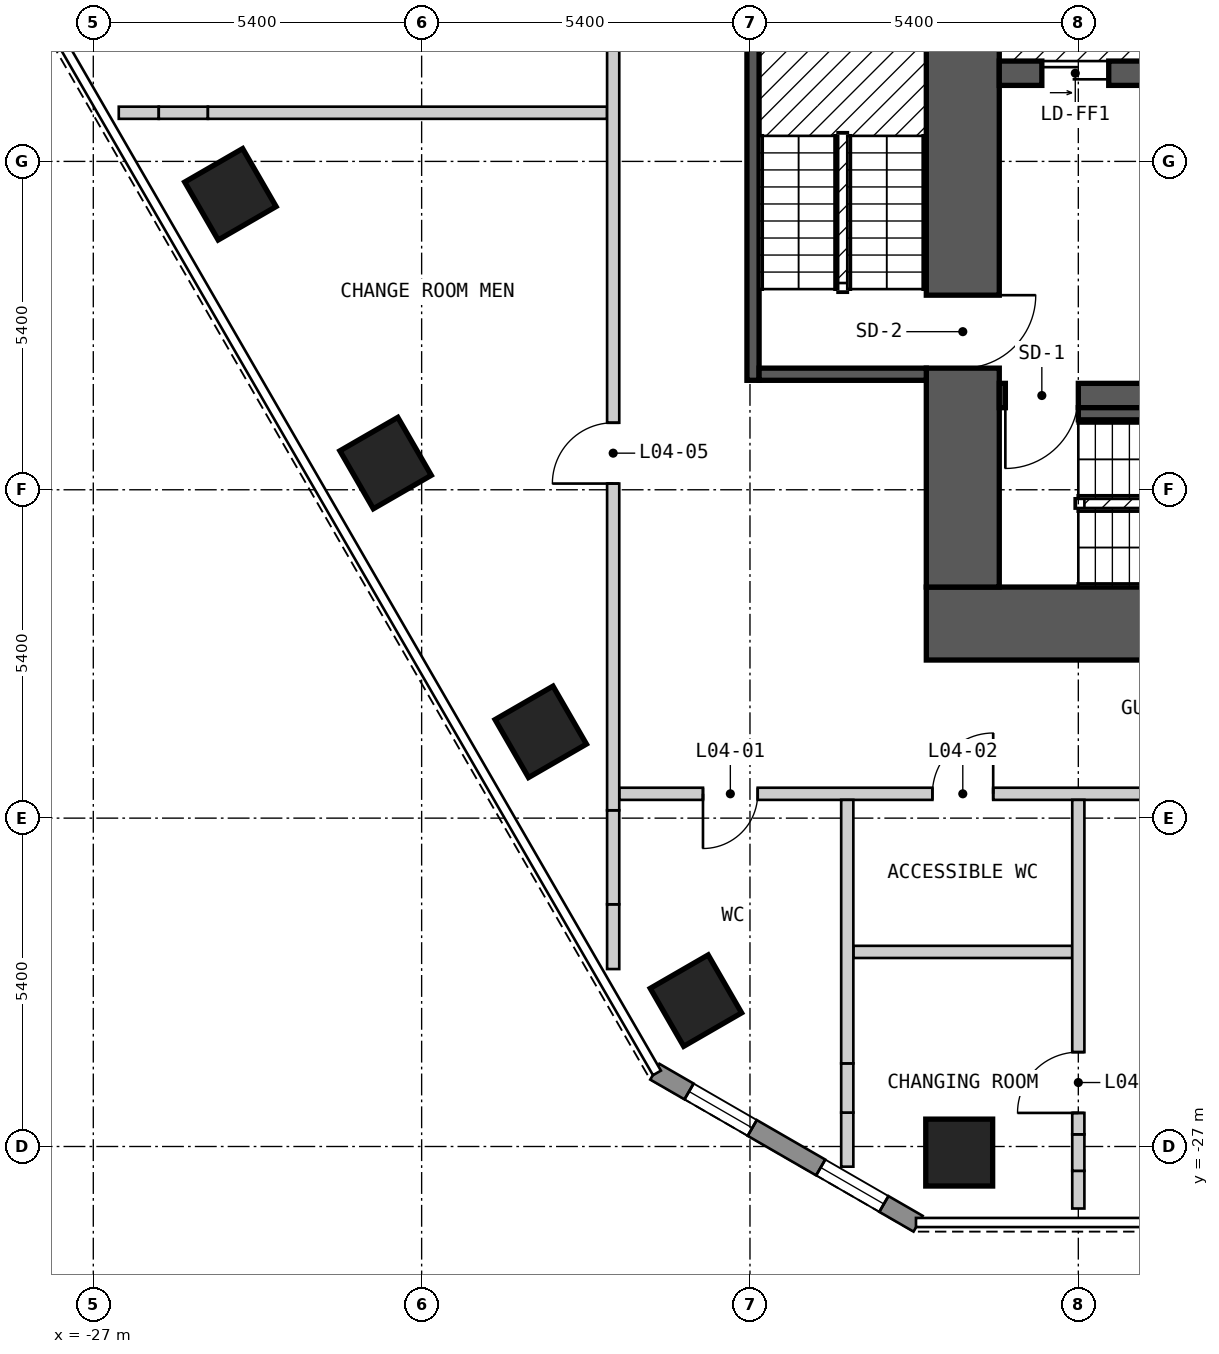
"""IFC4 building model, lengths in metres.
Left out: names, types, materials, properties, quantities, classifications, styles, units other than length and angle.
Written with IfcOpenShell. Run it as: python <this file> out.ifc"""

import sys

from ifc_helpers import new_model, si_unit, direction, frame, frame_2d, origin, origin_2d, place, context, subcontext, project, spatial, polyline, rectangle, outline, extrude, element, fill, save


model = new_model("IFC4")
c1 = context("Model", 3, precision=1e-05, world=origin(), true_north=direction((0.0, 1.0)))
c2 = subcontext(c1, "Body", "Model", "MODEL_VIEW")
j1 = project(units=[si_unit("LENGTHUNIT", "METRE"), si_unit("PLANEANGLEUNIT", "RADIAN")], contexts=[c1])
p1 = place(None, origin())
s1 = spatial("IfcSite", under=j1, at=p1, CompositionType="ELEMENT")
p2 = place(p1, origin())
s2 = spatial("IfcBuilding", under=s1, at=p2, CompositionType="ELEMENT")
p3 = place(p2, frame((0.0, 0.0, 16.2)))
s3 = spatial("IfcBuildingStorey", under=s2, at=p3, CompositionType="ELEMENT", Elevation=16.2)
for number, where, z_axis, x_axis in (
    (1, (-24.745, -11.341, 0.0), (0.0, 0.0, 1.0), (0.5, -0.866, 0.0)),
    (2, (-22.193, -15.761, 0.0), (0.0, 0.0, 1.0), (0.5, -0.866, 0.0)),
    (3, (-19.641, -20.181, 0.0), (0.0, 0.0, 1.0), (0.5, -0.866, 0.0)),
    (4, (-17.089, -24.601, 0.0), (0.0, 0.0, 1.0), (0.5, -0.866, 0.0)),
    (5, (-12.759, -27.1, 0.0), (0.0, 0.0, 1.0), (1.0, 0.0, 0.0)),
):
    element("IfcColumn", number, at=place(p3, frame(where, z_axis=z_axis, x_axis=x_axis)), inside=s3, PredefinedType="COLUMN", context=c2, shape_type="SweptSolid", body=[
        extrude(rectangle(XDim=1.1, YDim=1.1, at=origin_2d()), origin(), (0.0, 0.0, 1.0), 3.6),
    ])
p4 = place(p3, frame((-13.3, -18.4, 0.0), z_axis=(0.0, 0.0, 1.0), x_axis=(1.0, 0.0, 0.0)))
e6 = element("IfcWall", 6, at=p4, inside=s3, PredefinedType="SHEAR", context=c2, shape_type="SweptSolid", body=[
    extrude(rectangle(XDim=26.6, YDim=1.2, at=frame_2d((13.3, 0.0))), origin(), (0.0, 0.0, 1.0), 3.25),
])
p5 = place(p3, frame((-12.7, -17.8, 0.0), z_axis=(0.0, 0.0, 1.0), x_axis=(0.0, 1.0, 0.0)))
e7 = element("IfcWall", 7, at=p5, inside=s3, PredefinedType="SHEAR", context=c2, shape_type="SweptSolid", body=[
    extrude(rectangle(XDim=11.6, YDim=1.2, at=frame_2d((5.8, 0.0))), origin(), (0.0, 0.0, 1.0), 3.25),
])
p6 = place(p5, frame((3.6, 0.0, 0.0)))
e8 = element("IfcOpeningElement", 8, at=p6, cuts=e7, PredefinedType="OPENING", context=c2, shape_type="SweptSolid", body=[
    extrude(rectangle(XDim=1.2, YDim=2.1, at=frame_2d((0.6, 1.05))), frame((0.0, 0.61, 0.0), z_axis=(0.0, -1.0, 0.0), x_axis=(1.0, 0.0, 0.0)), (0.0, 0.0, 1.0), 1.22),
])
p7 = place(p3, frame((-12.1, -14.65, 0.0), z_axis=(0.0, 0.0, 1.0), x_axis=(1.0, 0.0, 0.0)))
e9 = element("IfcWall", 9, at=p7, inside=s3, PredefinedType="SHEAR", context=c2, shape_type="SweptSolid", body=[
    extrude(rectangle(XDim=24.2, YDim=0.4, at=frame_2d((12.1, 0.0))), origin(), (0.0, 0.0, 1.0), 3.25),
])
p8 = place(p7, frame((1.3, 0.0, 0.0), z_axis=(0.0, 0.0, 1.0), x_axis=(-1.0, 0.0, 0.0)))
e10 = element("IfcOpeningElement", 10, at=p8, cuts=e9, PredefinedType="OPENING", context=c2, shape_type="SweptSolid", body=[
    extrude(rectangle(XDim=1.2, YDim=2.1, at=frame_2d((0.6, 1.05))), frame((0.0, 0.21, 0.0), z_axis=(0.0, -1.0, 0.0), x_axis=(1.0, 0.0, 0.0)), (0.0, 0.0, 1.0), 0.42),
])
p9 = place(p7, frame((24.15, 0.0, 0.0), z_axis=(0.0, 0.0, 1.0), x_axis=(-1.0, 0.0, 0.0)))
e11 = element("IfcOpeningElement", 11, at=p9, cuts=e9, PredefinedType="OPENING", context=c2, shape_type="SweptSolid", body=[
    extrude(rectangle(XDim=1.2, YDim=2.1, at=frame_2d((0.6, 1.05))), frame((0.0, 0.21, 0.0), z_axis=(0.0, -1.0, 0.0), x_axis=(1.0, 0.0, 0.0)), (0.0, 0.0, 1.0), 0.42),
])
p10 = place(p7, frame((17.2, 0.0, 0.0), z_axis=(0.0, 0.0, 1.0), x_axis=(-1.0, 0.0, 0.0)))
e12 = element("IfcOpeningElement", 12, at=p10, cuts=e9, PredefinedType="OPENING", context=c2, shape_type="SweptSolid", body=[
    extrude(rectangle(XDim=1.0, YDim=2.1, at=frame_2d((0.5, 1.05))), frame((0.0, 0.21, 0.0), z_axis=(0.0, -1.0, 0.0), x_axis=(1.0, 0.0, 0.0)), (0.0, 0.0, 1.0), 0.42),
])
p11 = place(p3, frame((-12.1, -9.35, 0.0), z_axis=(0.0, 0.0, 1.0), x_axis=(1.0, 0.0, 0.0)))
e13 = element("IfcWall", 13, at=p11, inside=s3, PredefinedType="SHEAR", context=c2, shape_type="SweptSolid", body=[
    extrude(rectangle(XDim=22.3, YDim=0.4, at=frame_2d((11.15, 0.0))), origin(), (0.0, 0.0, 1.0), 3.25),
])
p12 = place(p11, frame((0.7, 0.0, 0.0)))
e14 = element("IfcOpeningElement", 14, at=p12, cuts=e13, PredefinedType="OPENING", context=c2, shape_type="SweptSolid", body=[
    extrude(rectangle(XDim=1.1, YDim=2.1, at=frame_2d((0.55, 1.05))), frame((0.0, 0.21, 0.0), z_axis=(0.0, -1.0, 0.0), x_axis=(1.0, 0.0, 0.0)), (0.0, 0.0, 1.0), 0.42),
])
p13 = place(p11, frame((3.5, 0.0, 0.0)))
e15 = element("IfcOpeningElement", 15, at=p13, cuts=e13, PredefinedType="OPENING", context=c2, shape_type="SweptSolid", body=[
    extrude(rectangle(XDim=1.1, YDim=2.1, at=frame_2d((0.55, 1.05))), frame((0.0, 0.21, 0.0), z_axis=(0.0, -1.0, 0.0), x_axis=(1.0, 0.0, 0.0)), (0.0, 0.0, 1.0), 0.42),
])
p14 = place(p11, frame((6.3, 0.0, 0.0)))
e16 = element("IfcOpeningElement", 16, at=p14, cuts=e13, PredefinedType="OPENING", context=c2, shape_type="SweptSolid", body=[
    extrude(rectangle(XDim=1.1, YDim=2.1, at=frame_2d((0.55, 1.05))), frame((0.0, 0.21, 0.0), z_axis=(0.0, -1.0, 0.0), x_axis=(1.0, 0.0, 0.0)), (0.0, 0.0, 1.0), 0.42),
])
p15 = place(p11, frame((8.6, 0.0, 0.0)))
e17 = element("IfcOpeningElement", 17, at=p15, cuts=e13, PredefinedType="OPENING", context=c2, shape_type="SweptSolid", body=[
    extrude(rectangle(XDim=1.1, YDim=2.1, at=frame_2d((0.55, 1.05))), frame((0.0, 0.21, 0.0), z_axis=(0.0, -1.0, 0.0), x_axis=(1.0, 0.0, 0.0)), (0.0, 0.0, 1.0), 0.42),
])
p16 = place(p11, frame((10.9, 0.0, 0.0)))
e18 = element("IfcOpeningElement", 18, at=p16, cuts=e13, PredefinedType="OPENING", context=c2, shape_type="SweptSolid", body=[
    extrude(rectangle(XDim=1.1, YDim=2.1, at=frame_2d((0.55, 1.05))), frame((0.0, 0.21, 0.0), z_axis=(0.0, -1.0, 0.0), x_axis=(1.0, 0.0, 0.0)), (0.0, 0.0, 1.0), 0.42),
])
p17 = place(p11, frame((13.2, 0.0, 0.0)))
e19 = element("IfcOpeningElement", 19, at=p17, cuts=e13, PredefinedType="OPENING", context=c2, shape_type="SweptSolid", body=[
    extrude(rectangle(XDim=1.1, YDim=2.1, at=frame_2d((0.55, 1.05))), frame((0.0, 0.21, 0.0), z_axis=(0.0, -1.0, 0.0), x_axis=(1.0, 0.0, 0.0)), (0.0, 0.0, 1.0), 0.42),
])
p18 = place(p11, frame((15.5, 0.0, 0.0)))
e20 = element("IfcOpeningElement", 20, at=p18, cuts=e13, PredefinedType="OPENING", context=c2, shape_type="SweptSolid", body=[
    extrude(rectangle(XDim=1.1, YDim=2.1, at=frame_2d((0.55, 1.05))), frame((0.0, 0.21, 0.0), z_axis=(0.0, -1.0, 0.0), x_axis=(1.0, 0.0, 0.0)), (0.0, 0.0, 1.0), 0.42),
])
p19 = place(p11, frame((17.8, 0.0, 0.0)))
e21 = element("IfcOpeningElement", 21, at=p19, cuts=e13, PredefinedType="OPENING", context=c2, shape_type="SweptSolid", body=[
    extrude(rectangle(XDim=1.1, YDim=2.1, at=frame_2d((0.55, 1.05))), frame((0.0, 0.21, 0.0), z_axis=(0.0, -1.0, 0.0), x_axis=(1.0, 0.0, 0.0)), (0.0, 0.0, 1.0), 0.42),
])
p20 = place(p11, frame((20.2, 0.0, 0.0)))
e22 = element("IfcOpeningElement", 22, at=p20, cuts=e13, PredefinedType="OPENING", context=c2, shape_type="SweptSolid", body=[
    extrude(rectangle(XDim=1.1, YDim=2.1, at=frame_2d((0.55, 1.05))), frame((0.0, 0.21, 0.0), z_axis=(0.0, -1.0, 0.0), x_axis=(1.0, 0.0, 0.0)), (0.0, 0.0, 1.0), 0.42),
])
p21 = place(p3, frame((-17.765, -25.77, 0.0), z_axis=(0.0, 0.0, 1.0), x_axis=(0.866010750942, -0.50002537861, 0.0)))
e23 = element("IfcWall", 23, at=p21, inside=s3, PredefinedType="SOLIDWALL", context=c2, shape_type="SweptSolid", body=[
    extrude(outline(polyline([(0.0, -0.15), (5.0, -0.15), (4.919, 0.15), (0.08, 0.15), (0.0, -0.15)])), origin(), (0.0, 0.0, 1.0), 3.25),
])
p22 = place(p21, frame((0.65, 0.0, 0.15)))
e24 = element("IfcOpeningElement", 24, at=p22, cuts=e23, PredefinedType="OPENING", context=c2, shape_type="SweptSolid", body=[
    extrude(rectangle(XDim=1.2, YDim=2.1, at=frame_2d((0.6, 1.05))), frame((0.0, 0.16, 0.0), z_axis=(0.0, -1.0, 0.0), x_axis=(1.0, 0.0, 0.0)), (0.0, 0.0, 1.0), 0.32),
])
p23 = place(p21, frame((3.15, 0.0, 0.15)))
e25 = element("IfcOpeningElement", 25, at=p23, cuts=e23, PredefinedType="OPENING", context=c2, shape_type="SweptSolid", body=[
    extrude(rectangle(XDim=1.2, YDim=2.1, at=frame_2d((0.6, 1.05))), frame((0.0, 0.16, 0.0), z_axis=(0.0, -1.0, 0.0), x_axis=(1.0, 0.0, 0.0)), (0.0, 0.0, 1.0), 0.32),
])
p24 = place(p3, frame((-14.5, -23.8, 0.0), z_axis=(0.0, 0.0, 1.0), x_axis=(1.0, 0.0, 0.0)))
e26 = element("IfcWall", 26, at=p24, inside=s3, PredefinedType="PARTITIONING", context=c2, shape_type="SweptSolid", body=[
    extrude(rectangle(XDim=3.6, YDim=0.2, at=frame_2d((1.8, 0.0))), origin(), (0.0, 0.0, 1.0), 3.25),
])
p25 = place(p3, frame((-18.35, -21.2, 0.0), z_axis=(0.0, 0.0, 1.0), x_axis=(1.0, 0.0, 0.0)))
e27 = element("IfcWall", 27, at=p25, inside=s3, PredefinedType="PARTITIONING", context=c2, shape_type="SweptSolid", body=[
    extrude(rectangle(XDim=24.1, YDim=0.2, at=frame_2d((12.05, 0.0))), origin(), (0.0, 0.0, 1.0), 3.25),
])
p26 = place(p25, frame((2.277, 0.0, 0.0), z_axis=(0.0, 0.0, 1.0), x_axis=(-1.0, 0.0, 0.0)))
e28 = element("IfcOpeningElement", 28, at=p26, cuts=e27, PredefinedType="OPENING", context=c2, shape_type="SweptSolid", body=[
    extrude(rectangle(XDim=0.9, YDim=2.1, at=frame_2d((0.45, 1.05))), frame((0.0, 0.11, 0.0), z_axis=(0.0, -1.0, 0.0), x_axis=(1.0, 0.0, 0.0)), (0.0, 0.0, 1.0), 0.22),
])
p27 = place(p25, frame((6.15, 0.0, 0.0), z_axis=(0.0, 0.0, 1.0), x_axis=(-1.0, 0.0, 0.0)))
e29 = element("IfcOpeningElement", 29, at=p27, cuts=e27, PredefinedType="OPENING", context=c2, shape_type="SweptSolid", body=[
    extrude(rectangle(XDim=1.0, YDim=2.1, at=frame_2d((0.5, 1.05))), frame((0.0, 0.11, 0.0), z_axis=(0.0, -1.0, 0.0), x_axis=(1.0, 0.0, 0.0)), (0.0, 0.0, 1.0), 0.22),
])
p28 = place(p25, frame((14.923, 0.0, 0.0)))
e30 = element("IfcOpeningElement", 30, at=p28, cuts=e27, PredefinedType="OPENING", context=c2, shape_type="SweptSolid", body=[
    extrude(rectangle(XDim=1.8, YDim=2.1, at=frame_2d((0.9, 1.05))), frame((0.0, 0.11, 0.0), z_axis=(0.0, -1.0, 0.0), x_axis=(1.0, 0.0, 0.0)), (0.0, 0.0, 1.0), 0.22),
])
p29 = place(p3, frame((-26.581, -10.0, 0.0), z_axis=(0.0, 0.0, 1.0), x_axis=(1.0, 0.0, 0.0)))
e31 = element("IfcWall", 31, at=p29, inside=s3, PredefinedType="PARTITIONING", context=c2, shape_type="SweptSolid", body=[
    extrude(rectangle(XDim=0.658, YDim=0.2, at=frame_2d((0.329, 0.0))), origin(), (0.0, 0.0, 1.0), 3.25),
])
p30 = place(p3, frame((-25.923, -10.0, 0.0), z_axis=(0.0, 0.0, 1.0), x_axis=(1.0, 0.0, 0.0)))
e32 = element("IfcWall", 32, at=p30, inside=s3, PredefinedType="PARTITIONING", context=c2, shape_type="SweptSolid", body=[
    extrude(rectangle(XDim=0.808, YDim=0.2, at=frame_2d((0.404, 0.0))), origin(), (0.0, 0.0, 1.0), 2.52),
])
p31 = place(p3, frame((-25.115, -10.0, 0.0), z_axis=(0.0, 0.0, 1.0), x_axis=(1.0, 0.0, 0.0)))
e33 = element("IfcWall", 33, at=p31, inside=s3, PredefinedType="PARTITIONING", context=c2, shape_type="SweptSolid", body=[
    extrude(rectangle(XDim=6.565, YDim=0.2, at=frame_2d((3.282, 0.0))), origin(), (0.0, 0.0, 1.0), 3.25),
])
p32 = place(p3, frame((-18.45, -24.082, 0.0), z_axis=(0.0, 0.0, 1.0), x_axis=(0.0, 1.0, 0.0)))
e34 = element("IfcWall", 34, at=p32, inside=s3, PredefinedType="PARTITIONING", context=c2, shape_type="SweptSolid", body=[
    extrude(rectangle(XDim=1.065, YDim=0.2, at=frame_2d((0.532, 0.0))), origin(), (0.0, 0.0, 1.0), 3.25),
])
p33 = place(p3, frame((-18.45, -23.017, 0.0), z_axis=(0.0, 0.0, 1.0), x_axis=(0.0, 1.0, 0.0)))
e35 = element("IfcWall", 35, at=p33, inside=s3, PredefinedType="PARTITIONING", context=c2, shape_type="SweptSolid", body=[
    extrude(rectangle(XDim=1.546, YDim=0.2, at=frame_2d((0.773, 0.0))), origin(), (0.0, 0.0, 1.0), 2.52),
])
p34 = place(p3, frame((-18.45, -21.471, 0.0), z_axis=(0.0, 0.0, 1.0), x_axis=(0.0, 1.0, 0.0)))
e36 = element("IfcWall", 36, at=p34, inside=s3, PredefinedType="PARTITIONING", context=c2, shape_type="SweptSolid", body=[
    extrude(rectangle(XDim=23.371, YDim=0.2, at=frame_2d((11.686, 0.0))), origin(), (0.0, 0.0, 1.0), 3.25),
])
p35 = place(p34, frame((5.373, 0.0, 0.0)))
e37 = element("IfcOpeningElement", 37, at=p35, cuts=e36, PredefinedType="OPENING", context=c2, shape_type="SweptSolid", body=[
    extrude(rectangle(XDim=1.0, YDim=2.1, at=frame_2d((0.5, 1.05))), frame((0.0, 0.11, 0.0), z_axis=(0.0, -1.0, 0.0), x_axis=(1.0, 0.0, 0.0)), (0.0, 0.0, 1.0), 0.22),
])
p36 = place(p34, frame((16.969, 0.0, 0.0)))
e38 = element("IfcOpeningElement", 38, at=p36, cuts=e36, PredefinedType="OPENING", context=c2, shape_type="SweptSolid", body=[
    extrude(rectangle(XDim=1.0, YDim=2.1, at=frame_2d((0.5, 1.05))), frame((0.0, 0.11, 0.0), z_axis=(0.0, -1.0, 0.0), x_axis=(1.0, 0.0, 0.0)), (0.0, 0.0, 1.0), 0.22),
])
p37 = place(p3, frame((-14.6, -27.332, 0.0), z_axis=(0.0, 0.0, 1.0), x_axis=(0.0, 1.0, 0.0)))
e39 = element("IfcWall", 39, at=p37, inside=s3, PredefinedType="PARTITIONING", context=c2, shape_type="SweptSolid", body=[
    extrude(rectangle(XDim=0.89, YDim=0.2, at=frame_2d((0.445, 0.0))), origin(), (0.0, 0.0, 1.0), 3.25),
])
p38 = place(p3, frame((-14.6, -26.442, 0.0), z_axis=(0.0, 0.0, 1.0), x_axis=(0.0, 1.0, 0.0)))
e40 = element("IfcWall", 40, at=p38, inside=s3, PredefinedType="PARTITIONING", context=c2, shape_type="SweptSolid", body=[
    extrude(rectangle(XDim=0.809, YDim=0.2, at=frame_2d((0.404, 0.0))), origin(), (0.0, 0.0, 1.0), 2.52),
])
p39 = place(p3, frame((-14.6, -25.633, 0.0), z_axis=(0.0, 0.0, 1.0), x_axis=(0.0, 1.0, 0.0)))
e41 = element("IfcWall", 41, at=p39, inside=s3, PredefinedType="PARTITIONING", context=c2, shape_type="SweptSolid", body=[
    extrude(rectangle(XDim=4.333, YDim=0.2, at=frame_2d((2.167, 0.0))), origin(), (0.0, 0.0, 1.0), 3.25),
])
p40 = place(p3, frame((-10.8, -28.02, 0.0), z_axis=(0.0, 0.0, 1.0), x_axis=(0.0, 1.0, 0.0)))
e42 = element("IfcWall", 42, at=p40, inside=s3, PredefinedType="PARTITIONING", context=c2, shape_type="SweptSolid", body=[
    extrude(rectangle(XDim=0.62, YDim=0.2, at=frame_2d((0.31, 0.0))), origin(), (0.0, 0.0, 1.0), 3.25),
])
p41 = place(p3, frame((-10.8, -27.4, 0.0), z_axis=(0.0, 0.0, 1.0), x_axis=(0.0, 1.0, 0.0)))
e43 = element("IfcWall", 43, at=p41, inside=s3, PredefinedType="PARTITIONING", context=c2, shape_type="SweptSolid", body=[
    extrude(rectangle(XDim=0.6, YDim=0.2, at=frame_2d((0.3, 0.0))), origin(), (0.0, 0.0, 1.0), 2.52),
])
p42 = place(p3, frame((-10.8, -26.8, 0.0), z_axis=(0.0, 0.0, 1.0), x_axis=(0.0, 1.0, 0.0)))
e44 = element("IfcWall", 44, at=p42, inside=s3, PredefinedType="PARTITIONING", context=c2, shape_type="SweptSolid", body=[
    extrude(rectangle(XDim=5.5, YDim=0.2, at=frame_2d((2.75, 0.0))), origin(), (0.0, 0.0, 1.0), 3.25),
])
p43 = place(p42, frame((0.352, 0.0, 0.0)))
e45 = element("IfcOpeningElement", 45, at=p43, cuts=e44, PredefinedType="OPENING", context=c2, shape_type="SweptSolid", body=[
    extrude(rectangle(XDim=1.0, YDim=2.1, at=frame_2d((0.5, 1.05))), frame((0.0, 0.11, 0.0), z_axis=(0.0, -1.0, 0.0), x_axis=(1.0, 0.0, 0.0)), (0.0, 0.0, 1.0), 0.22),
])
p44 = place(p3, frame((-16.15, -14.4, 0.0), z_axis=(0.0, 0.0, 1.0), x_axis=(0.0, 1.0, 0.0)))
e46 = element("IfcWall", 46, at=p44, inside=s3, PredefinedType="SOLIDWALL", context=c2, shape_type="SweptSolid", body=[
    extrude(rectangle(XDim=5.8, YDim=0.2, at=frame_2d((2.9, 0.0))), origin(), (0.0, 0.0, 1.0), 3.25),
])
p45 = place(p3, frame((-16.05, -14.3, 0.0), z_axis=(0.0, 0.0, 1.0), x_axis=(1.0, 0.0, 0.0)))
e47 = element("IfcWall", 47, at=p45, inside=s3, PredefinedType="SOLIDWALL", context=c2, shape_type="SweptSolid", body=[
    extrude(rectangle(XDim=2.75, YDim=0.2, at=frame_2d((1.375, 0.0))), origin(), (0.0, 0.0, 1.0), 3.25),
])
p46 = place(p3, frame((-10.8, -14.95, 0.0), z_axis=(0.0, 0.0, 1.0), x_axis=(1.0, 0.0, 0.0)))
e48 = element("IfcWall", 48, at=p46, inside=s3, PredefinedType="SOLIDWALL", context=c2, shape_type="SweptSolid", body=[
    extrude(rectangle(XDim=4.1, YDim=0.2, at=frame_2d((2.05, 0.0))), origin(), (0.0, 0.0, 1.0), 3.25),
])
p47 = place(p22, origin())
e49 = element("IfcWindow", 49, at=p47, inside=s3, PartitioningType="SINGLE_PANEL", PredefinedType="WINDOW", context=c2, shape_type="SweptSolid", body=[
    extrude(rectangle(XDim=1.2, YDim=2.1, at=frame_2d((0.6, 1.05))), frame((0.0, 0.03, 0.0), z_axis=(0.0, -1.0, 0.0), x_axis=(1.0, 0.0, 0.0)), (0.0, 0.0, 1.0), 0.06),
])
fill(e24, e49)
p48 = place(p23, origin())
e50 = element("IfcWindow", 50, at=p48, inside=s3, PartitioningType="SINGLE_PANEL", PredefinedType="WINDOW", context=c2, shape_type="SweptSolid", body=[
    extrude(rectangle(XDim=1.2, YDim=2.1, at=frame_2d((0.6, 1.05))), frame((0.0, 0.03, 0.0), z_axis=(0.0, -1.0, 0.0), x_axis=(1.0, 0.0, 0.0)), (0.0, 0.0, 1.0), 0.06),
])
fill(e25, e50)
p49 = place(p26, origin())
e51 = element("IfcDoor", 51, at=p49, inside=s3, OperationType="SINGLE_SWING_RIGHT", PredefinedType="DOOR", context=c2, shape_type="SweptSolid", body=[
    extrude(rectangle(XDim=0.9, YDim=2.1, at=frame_2d((0.45, 1.05))), frame((0.0, 0.025, 0.0), z_axis=(0.0, -1.0, 0.0), x_axis=(1.0, 0.0, 0.0)), (0.0, 0.0, 1.0), 0.05),
])
fill(e28, e51)
p50 = place(p27, origin())
e52 = element("IfcDoor", 52, at=p50, inside=s3, OperationType="SINGLE_SWING_LEFT", PredefinedType="DOOR", context=c2, shape_type="SweptSolid", body=[
    extrude(rectangle(XDim=1.0, YDim=2.1, at=frame_2d((0.5, 1.05))), frame((0.0, 0.025, 0.0), z_axis=(0.0, -1.0, 0.0), x_axis=(1.0, 0.0, 0.0)), (0.0, 0.0, 1.0), 0.05),
])
fill(e29, e52)
p51 = place(p43, origin())
e53 = element("IfcDoor", 53, at=p51, inside=s3, OperationType="SINGLE_SWING_LEFT", PredefinedType="DOOR", context=c2, shape_type="SweptSolid", body=[
    extrude(rectangle(XDim=1.0, YDim=2.1, at=frame_2d((0.5, 1.05))), frame((0.0, 0.025, 0.0), z_axis=(0.0, -1.0, 0.0), x_axis=(1.0, 0.0, 0.0)), (0.0, 0.0, 1.0), 0.05),
])
fill(e45, e53)
p52 = place(p35, origin())
e54 = element("IfcDoor", 54, at=p52, inside=s3, OperationType="SINGLE_SWING_LEFT", PredefinedType="DOOR", context=c2, shape_type="SweptSolid", body=[
    extrude(rectangle(XDim=1.0, YDim=2.1, at=frame_2d((0.5, 1.05))), frame((0.0, 0.025, 0.0), z_axis=(0.0, -1.0, 0.0), x_axis=(1.0, 0.0, 0.0)), (0.0, 0.0, 1.0), 0.05),
])
fill(e37, e54)
p53 = place(p12, origin())
e55 = element("IfcDoor", 55, at=p53, inside=s3, OperationType="DOUBLE_DOOR_SLIDING", PredefinedType="DOOR", context=c2, shape_type="SweptSolid", body=[
    extrude(rectangle(XDim=1.1, YDim=2.1, at=frame_2d((0.55, 1.05))), frame((0.0, 0.025, 0.0), z_axis=(0.0, -1.0, 0.0), x_axis=(1.0, 0.0, 0.0)), (0.0, 0.0, 1.0), 0.05),
])
fill(e14, e55)
p54 = place(p8, origin())
e56 = element("IfcDoor", 56, at=p54, inside=s3, OperationType="SINGLE_SWING_RIGHT", PredefinedType="DOOR", context=c2, shape_type="SweptSolid", body=[
    extrude(rectangle(XDim=1.2, YDim=2.1, at=frame_2d((0.6, 1.05))), frame((0.0, 0.025, 0.0), z_axis=(0.0, -1.0, 0.0), x_axis=(1.0, 0.0, 0.0)), (0.0, 0.0, 1.0), 0.05),
])
fill(e10, e56)
p55 = place(p6, origin())
e57 = element("IfcDoor", 57, at=p55, inside=s3, OperationType="SINGLE_SWING_RIGHT", PredefinedType="DOOR", context=c2, shape_type="SweptSolid", body=[
    extrude(rectangle(XDim=1.2, YDim=2.1, at=frame_2d((0.6, 1.05))), frame((0.0, 0.025, 0.0), z_axis=(0.0, -1.0, 0.0), x_axis=(1.0, 0.0, 0.0)), (0.0, 0.0, 1.0), 0.05),
])
fill(e8, e57)
save(model, sys.argv[1])
